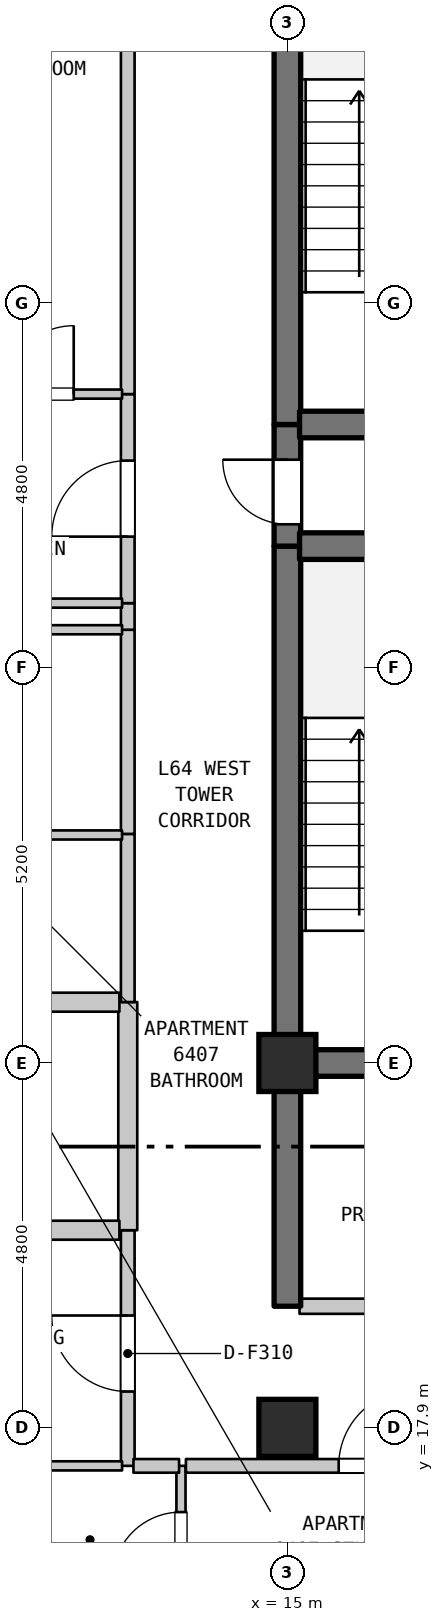
"""IFC4 building model, lengths in metres.
Left out: names, types, materials, properties, quantities, classifications, styles, units other than length and angle.
Written with IfcOpenShell. Run it as: python <this file> out.ifc"""

import sys

from ifc_helpers import new_model, si_unit, direction, frame, frame_2d, origin, origin_2d, place, context, subcontext, project, spatial, rectangle, extrude, element, fill, save


model = new_model("IFC4")
c1 = context("Model", 3, precision=1e-05, world=origin(), true_north=direction((0.0, 1.0)))
c2 = subcontext(c1, "Body", "Model", "MODEL_VIEW")
j1 = project(units=[si_unit("LENGTHUNIT", "METRE"), si_unit("PLANEANGLEUNIT", "RADIAN")], contexts=[c1])
p1 = place(None, origin())
s1 = spatial("IfcSite", under=j1, at=p1, CompositionType="ELEMENT")
p2 = place(p1, origin())
s2 = spatial("IfcBuilding", under=s1, at=p2, CompositionType="ELEMENT")
p3 = place(p2, frame((0.0, 0.0, 258.4)))
s3 = spatial("IfcBuildingStorey", under=s2, at=p3, CompositionType="ELEMENT", Elevation=258.4)
for number, where, z_axis, x_axis in (
    (1, (15.0, 17.9, 0.0), (0.0, 0.0, 1.0), (1.0, 0.0, 0.0)),
    (2, (15.0, 22.7, 0.0), (0.0, 0.0, 1.0), (1.0, 0.0, 0.0)),
):
    element("IfcColumn", number, at=place(p3, frame(where, z_axis=z_axis, x_axis=x_axis)), inside=s3, PredefinedType="COLUMN", context=c2, shape_type="SweptSolid", body=[
        extrude(rectangle(XDim=0.75, YDim=0.75, at=origin_2d()), origin(), (0.0, 0.0, 1.0), 3.7),
    ])
p4 = place(p3, frame((12.9, 17.4, 0.0), z_axis=(0.0, 0.0, 1.0), x_axis=(0.0, 1.0, 0.0)))
e3 = element("IfcWall", 3, at=p4, inside=s3, PredefinedType="STANDARD", context=c2, shape_type="SweptSolid", body=[
    extrude(rectangle(XDim=3.1, YDim=0.18, at=frame_2d((1.55, 0.0))), origin(), (0.0, 0.0, 1.0), 3.39),
])
p5 = place(p4, frame((0.978, 0.0, 0.0)))
e4 = element("IfcOpeningElement", 4, at=p5, cuts=e3, PredefinedType="OPENING", context=c2, shape_type="SweptSolid", body=[
    extrude(rectangle(XDim=1.0, YDim=2.15, at=frame_2d((0.5, 1.075))), frame((0.0, 0.1, 0.0), z_axis=(0.0, -1.0, 0.0), x_axis=(1.0, 0.0, 0.0)), (0.0, 0.0, 1.0), 0.2),
])
p6 = place(p3, frame((12.9, 20.5, 0.0), z_axis=(0.0, 0.0, 1.0), x_axis=(0.0, 1.0, 0.0)))
e5 = element("IfcWall", 5, at=p6, inside=s3, PredefinedType="STANDARD", context=c2, shape_type="SweptSolid", body=[
    extrude(rectangle(XDim=3.002, YDim=0.25, at=frame_2d((1.501, 0.0))), origin(), (0.0, 0.0, 1.0), 3.39),
])
p7 = place(p3, frame((12.9, 23.502, 0.0), z_axis=(0.0, 0.0, 1.0), x_axis=(0.0, 1.0, 0.0)))
e6 = element("IfcWall", 6, at=p7, inside=s3, PredefinedType="STANDARD", context=c2, shape_type="SweptSolid", body=[
    extrude(rectangle(XDim=2.212, YDim=0.18, at=frame_2d((1.106, 0.0))), origin(), (0.0, 0.0, 1.0), 3.39),
])
p8 = place(p3, frame((12.9, 25.714, 0.0), z_axis=(0.0, 0.0, 1.0), x_axis=(0.0, 1.0, 0.0)))
e7 = element("IfcWall", 7, at=p8, inside=s3, PredefinedType="STANDARD", context=c2, shape_type="SweptSolid", body=[
    extrude(rectangle(XDim=2.686, YDim=0.18, at=frame_2d((1.343, 0.0))), origin(), (0.0, 0.0, 1.0), 3.39),
])
p9 = place(p3, frame((12.9, 28.4, 0.0), z_axis=(0.0, 0.0, 1.0), x_axis=(0.0, 1.0, 0.0)))
e8 = element("IfcWall", 8, at=p9, inside=s3, PredefinedType="STANDARD", context=c2, shape_type="SweptSolid", body=[
    extrude(rectangle(XDim=0.35, YDim=0.18, at=frame_2d((0.175, 0.0))), origin(), (0.0, 0.0, 1.0), 3.39),
])
p10 = place(p3, frame((12.9, 28.75, 0.0), z_axis=(0.0, 0.0, 1.0), x_axis=(0.0, 1.0, 0.0)))
e9 = element("IfcWall", 9, at=p10, inside=s3, PredefinedType="STANDARD", context=c2, shape_type="SweptSolid", body=[
    extrude(rectangle(XDim=2.75, YDim=0.18, at=frame_2d((1.375, 0.0))), origin(), (0.0, 0.0, 1.0), 3.39),
])
p11 = place(p10, frame((0.875, 0.0, 0.0)))
e10 = element("IfcOpeningElement", 10, at=p11, cuts=e9, PredefinedType="OPENING", context=c2, shape_type="SweptSolid", body=[
    extrude(rectangle(XDim=1.0, YDim=2.15, at=frame_2d((0.5, 1.075))), frame((0.0, 0.1, 0.0), z_axis=(0.0, -1.0, 0.0), x_axis=(1.0, 0.0, 0.0)), (0.0, 0.0, 1.0), 0.2),
])
p12 = place(p3, frame((12.9, 31.5, 0.0), z_axis=(0.0, 0.0, 1.0), x_axis=(0.0, 1.0, 0.0)))
e11 = element("IfcWall", 11, at=p12, inside=s3, PredefinedType="STANDARD", context=c2, shape_type="SweptSolid", body=[
    extrude(rectangle(XDim=8.6, YDim=0.18, at=frame_2d((4.3, 0.0))), origin(), (0.0, 0.0, 1.0), 3.39),
])
p13 = place(p3, frame((13.6, 15.45, 0.0), z_axis=(0.0, 0.0, 1.0), x_axis=(0.0, 1.0, 0.0)))
e12 = element("IfcWall", 12, at=p13, inside=s3, PredefinedType="PARTITIONING", context=c2, shape_type="SweptSolid", body=[
    extrude(rectangle(XDim=1.95, YDim=0.12, at=frame_2d((0.975, 0.0))), origin(), (0.0, 0.0, 1.0), 3.39),
])
p14 = place(p13, frame((0.442, 0.0, 0.0)))
e13 = element("IfcOpeningElement", 13, at=p14, cuts=e12, PredefinedType="OPENING", context=c2, shape_type="SweptSolid", body=[
    extrude(rectangle(XDim=0.9, YDim=2.15, at=frame_2d((0.45, 1.075))), frame((0.0, 0.07, 0.0), z_axis=(0.0, -1.0, 0.0), x_axis=(1.0, 0.0, 0.0)), (0.0, 0.0, 1.0), 0.14),
])
p15 = place(p3, frame((15.0, 19.5, 0.0), z_axis=(0.0, 0.0, 1.0), x_axis=(0.0, 1.0, 0.0)))
e14 = element("IfcWall", 14, at=p15, inside=s3, PredefinedType="SHEAR", context=c2, shape_type="SweptSolid", body=[
    extrude(rectangle(XDim=3.2, YDim=0.35, at=frame_2d((1.6, 0.0))), origin(), (0.0, 0.0, 1.0), 3.39),
])
p16 = place(p3, frame((15.0, 22.7, 0.0), z_axis=(0.0, 0.0, 1.0), x_axis=(0.0, 1.0, 0.0)))
e15 = element("IfcWall", 15, at=p16, inside=s3, PredefinedType="SHEAR", context=c2, shape_type="SweptSolid", body=[
    extrude(rectangle(XDim=6.8, YDim=0.35, at=frame_2d((3.4, 0.0))), origin(), (0.0, 0.0, 1.0), 3.39),
])
p17 = place(p3, frame((15.0, 29.5, 0.0), z_axis=(0.0, 0.0, 1.0), x_axis=(0.0, 1.0, 0.0)))
e16 = element("IfcWall", 16, at=p17, inside=s3, PredefinedType="SHEAR", context=c2, shape_type="SweptSolid", body=[
    extrude(rectangle(XDim=1.6, YDim=0.35, at=frame_2d((0.8, 0.0))), origin(), (0.0, 0.0, 1.0), 3.39),
])
p18 = place(p17, frame((0.287, 0.0, 0.0)))
e17 = element("IfcOpeningElement", 17, at=p18, cuts=e16, PredefinedType="OPENING", context=c2, shape_type="SweptSolid", body=[
    extrude(rectangle(XDim=0.85, YDim=2.1, at=frame_2d((0.425, 1.05))), frame((0.0, 0.185, 0.0), z_axis=(0.0, -1.0, 0.0), x_axis=(1.0, 0.0, 0.0)), (0.0, 0.0, 1.0), 0.37),
])
p19 = place(p3, frame((15.0, 31.1, 0.0), z_axis=(0.0, 0.0, 1.0), x_axis=(0.0, 1.0, 0.0)))
e18 = element("IfcWall", 18, at=p19, inside=s3, PredefinedType="SHEAR", context=c2, shape_type="SweptSolid", body=[
    extrude(rectangle(XDim=6.8, YDim=0.35, at=frame_2d((3.4, 0.0))), origin(), (0.0, 0.0, 1.0), 3.39),
])
p20 = place(p3, frame((11.47, 17.4, 0.0), z_axis=(0.0, 0.0, 1.0), x_axis=(1.0, 0.0, 0.0)))
e19 = element("IfcWall", 19, at=p20, inside=s3, PredefinedType="PARTITIONING", context=c2, shape_type="SweptSolid", body=[
    extrude(rectangle(XDim=1.355, YDim=0.12, at=frame_2d((0.677, 0.0))), origin(), (0.0, 0.0, 1.0), 3.39),
])
p21 = place(p3, frame((12.975, 17.4, 0.0), z_axis=(0.0, 0.0, 1.0), x_axis=(1.0, 0.0, 0.0)))
e20 = element("IfcWall", 20, at=p21, inside=s3, PredefinedType="STANDARD", context=c2, shape_type="SweptSolid", body=[
    extrude(rectangle(XDim=0.6, YDim=0.18, at=frame_2d((0.3, 0.0))), origin(), (0.0, 0.0, 1.0), 3.39),
])
p22 = place(p3, frame((13.665, 17.4, 0.0), z_axis=(0.0, 0.0, 1.0), x_axis=(1.0, 0.0, 0.0)))
e21 = element("IfcWall", 21, at=p22, inside=s3, PredefinedType="STANDARD", context=c2, shape_type="SweptSolid", body=[
    extrude(rectangle(XDim=3.69, YDim=0.18, at=frame_2d((1.845, 0.0))), origin(), (0.0, 0.0, 1.0), 3.39),
])
p23 = place(p22, frame((2.01, 0.0, 0.0)))
e22 = element("IfcOpeningElement", 22, at=p23, cuts=e21, PredefinedType="OPENING", context=c2, shape_type="SweptSolid", body=[
    extrude(rectangle(XDim=1.0, YDim=2.15, at=frame_2d((0.5, 1.075))), frame((0.0, 0.1, 0.0), z_axis=(0.0, -1.0, 0.0), x_axis=(1.0, 0.0, 0.0)), (0.0, 0.0, 1.0), 0.2),
])
p24 = place(p3, frame((15.16, 19.5, 0.0), z_axis=(0.0, 0.0, 1.0), x_axis=(1.0, 0.0, 0.0)))
e23 = element("IfcWall", 23, at=p24, inside=s3, PredefinedType="STANDARD", context=c2, shape_type="SweptSolid", body=[
    extrude(rectangle(XDim=3.68, YDim=0.2, at=frame_2d((1.84, 0.0))), origin(), (0.0, 0.0, 1.0), 3.39),
])
p25 = place(p24, frame((1.39, 0.0, 0.0)))
e24 = element("IfcOpeningElement", 24, at=p25, cuts=e23, PredefinedType="OPENING", context=c2, shape_type="SweptSolid", body=[
    extrude(rectangle(XDim=0.9, YDim=2.15, at=frame_2d((0.45, 1.075))), frame((0.0, 0.11, 0.0), z_axis=(0.0, -1.0, 0.0), x_axis=(1.0, 0.0, 0.0)), (0.0, 0.0, 1.0), 0.22),
])
p26 = place(p3, frame((10.76, 20.5, 0.0), z_axis=(0.0, 0.0, 1.0), x_axis=(1.0, 0.0, 0.0)))
e25 = element("IfcWall", 25, at=p26, inside=s3, PredefinedType="STANDARD", context=c2, shape_type="SweptSolid", body=[
    extrude(rectangle(XDim=2.03, YDim=0.25, at=frame_2d((1.015, 0.0))), origin(), (0.0, 0.0, 1.0), 3.39),
])
p27 = place(p3, frame((15.16, 22.7, 0.0), z_axis=(0.0, 0.0, 1.0), x_axis=(1.0, 0.0, 0.0)))
e26 = element("IfcWall", 26, at=p27, inside=s3, PredefinedType="SHEAR", context=c2, shape_type="SweptSolid", body=[
    extrude(rectangle(XDim=3.68, YDim=0.35, at=frame_2d((1.84, 0.0))), origin(), (0.0, 0.0, 1.0), 3.39),
])
p28 = place(p3, frame((10.76, 23.5, 0.0), z_axis=(0.0, 0.0, 1.0), x_axis=(1.0, 0.0, 0.0)))
e27 = element("IfcWall", 27, at=p28, inside=s3, PredefinedType="STANDARD", context=c2, shape_type="SweptSolid", body=[
    extrude(rectangle(XDim=2.03, YDim=0.25, at=frame_2d((1.015, 0.0))), origin(), (0.0, 0.0, 1.0), 3.39),
])
for number, where, z_axis, x_axis in (
    (28, (10.695, 25.7, 0.0), (0.0, 0.0, 1.0), (1.0, 0.0, 0.0)),
    (29, (10.695, 28.4, 0.0), (0.0, 0.0, 1.0), (1.0, 0.0, 0.0)),
):
    element("IfcWall", number, at=place(p3, frame(where, z_axis=z_axis, x_axis=x_axis)), inside=s3, PredefinedType="PARTITIONING", context=c2, shape_type="SweptSolid", body=[
        extrude(rectangle(XDim=2.13, YDim=0.12, at=frame_2d((1.065, 0.0))), origin(), (0.0, 0.0, 1.0), 3.39),
    ])
p29 = place(p3, frame((9.175, 28.75, 0.0), z_axis=(0.0, 0.0, 1.0), x_axis=(1.0, 0.0, 0.0)))
e30 = element("IfcWall", 30, at=p29, inside=s3, PredefinedType="PARTITIONING", context=c2, shape_type="SweptSolid", body=[
    extrude(rectangle(XDim=3.65, YDim=0.12, at=frame_2d((1.825, 0.0))), origin(), (0.0, 0.0, 1.0), 3.39),
])
for number, where, z_axis, x_axis in (
    (31, (15.16, 29.5, 0.0), (0.0, 0.0, 1.0), (1.0, 0.0, 0.0)),
    (32, (15.16, 31.1, 0.0), (0.0, 0.0, 1.0), (1.0, 0.0, 0.0)),
):
    element("IfcWall", number, at=place(p3, frame(where, z_axis=z_axis, x_axis=x_axis)), inside=s3, PredefinedType="SHEAR", context=c2, shape_type="SweptSolid", body=[
        extrude(rectangle(XDim=3.68, YDim=0.35, at=frame_2d((1.84, 0.0))), origin(), (0.0, 0.0, 1.0), 3.39),
    ])
p30 = place(p3, frame((10.623, 31.5, 0.0), z_axis=(0.0, 0.0, 1.0), x_axis=(1.0, 0.0, 0.0)))
e33 = element("IfcWall", 33, at=p30, inside=s3, PredefinedType="PARTITIONING", context=c2, shape_type="SweptSolid", body=[
    extrude(rectangle(XDim=2.202, YDim=0.12, at=frame_2d((1.101, 0.0))), origin(), (0.0, 0.0, 1.0), 3.39),
])
p31 = place(p30, frame((0.666, 0.0, 0.0)))
e34 = element("IfcOpeningElement", 34, at=p31, cuts=e33, PredefinedType="OPENING", context=c2, shape_type="SweptSolid", body=[
    extrude(rectangle(XDim=0.9, YDim=2.1, at=frame_2d((0.45, 1.05))), frame((0.0, 0.07, 0.0), z_axis=(0.0, -1.0, 0.0), x_axis=(1.0, 0.0, 0.0)), (0.0, 0.0, 1.0), 0.14),
])
p32 = place(p5, origin())
e35 = element("IfcDoor", 35, at=p32, inside=s3, OperationType="SINGLE_SWING_RIGHT", PredefinedType="DOOR", context=c2, shape_type="SweptSolid", body=[
    extrude(rectangle(XDim=1.0, YDim=2.15, at=frame_2d((0.5, 1.075))), frame((0.0, 0.025, 0.0), z_axis=(0.0, -1.0, 0.0), x_axis=(1.0, 0.0, 0.0)), (0.0, 0.0, 1.0), 0.05),
])
fill(e4, e35)
p33 = place(p11, origin())
e36 = element("IfcDoor", 36, at=p33, inside=s3, OperationType="SINGLE_SWING_LEFT", PredefinedType="DOOR", context=c2, shape_type="SweptSolid", body=[
    extrude(rectangle(XDim=1.0, YDim=2.15, at=frame_2d((0.5, 1.075))), frame((0.0, 0.025, 0.0), z_axis=(0.0, -1.0, 0.0), x_axis=(1.0, 0.0, 0.0)), (0.0, 0.0, 1.0), 0.05),
])
fill(e10, e36)
p34 = place(p14, origin())
e37 = element("IfcDoor", 37, at=p34, inside=s3, OperationType="SINGLE_SWING_LEFT", PredefinedType="DOOR", context=c2, shape_type="SweptSolid", body=[
    extrude(rectangle(XDim=0.9, YDim=2.15, at=frame_2d((0.45, 1.075))), frame((0.0, 0.025, 0.0), z_axis=(0.0, -1.0, 0.0), x_axis=(1.0, 0.0, 0.0)), (0.0, 0.0, 1.0), 0.05),
])
fill(e13, e37)
p35 = place(p18, origin())
e38 = element("IfcDoor", 38, at=p35, inside=s3, OperationType="SINGLE_SWING_RIGHT", PredefinedType="DOOR", context=c2, shape_type="SweptSolid", body=[
    extrude(rectangle(XDim=0.85, YDim=2.1, at=frame_2d((0.425, 1.05))), frame((0.0, 0.025, 0.0), z_axis=(0.0, -1.0, 0.0), x_axis=(1.0, 0.0, 0.0)), (0.0, 0.0, 1.0), 0.05),
])
fill(e17, e38)
p36 = place(p23, origin())
e39 = element("IfcDoor", 39, at=p36, inside=s3, OperationType="SINGLE_SWING_RIGHT", PredefinedType="DOOR", context=c2, shape_type="SweptSolid", body=[
    extrude(rectangle(XDim=1.0, YDim=2.15, at=frame_2d((0.5, 1.075))), frame((0.0, 0.025, 0.0), z_axis=(0.0, -1.0, 0.0), x_axis=(1.0, 0.0, 0.0)), (0.0, 0.0, 1.0), 0.05),
])
fill(e22, e39)
p37 = place(p31, origin())
e40 = element("IfcDoor", 40, at=p37, inside=s3, OperationType="SINGLE_SWING_RIGHT", PredefinedType="DOOR", context=c2, shape_type="SweptSolid", body=[
    extrude(rectangle(XDim=0.9, YDim=2.1, at=frame_2d((0.45, 1.05))), frame((0.0, 0.025, 0.0), z_axis=(0.0, -1.0, 0.0), x_axis=(1.0, 0.0, 0.0)), (0.0, 0.0, 1.0), 0.05),
])
fill(e34, e40)
save(model, sys.argv[1])
